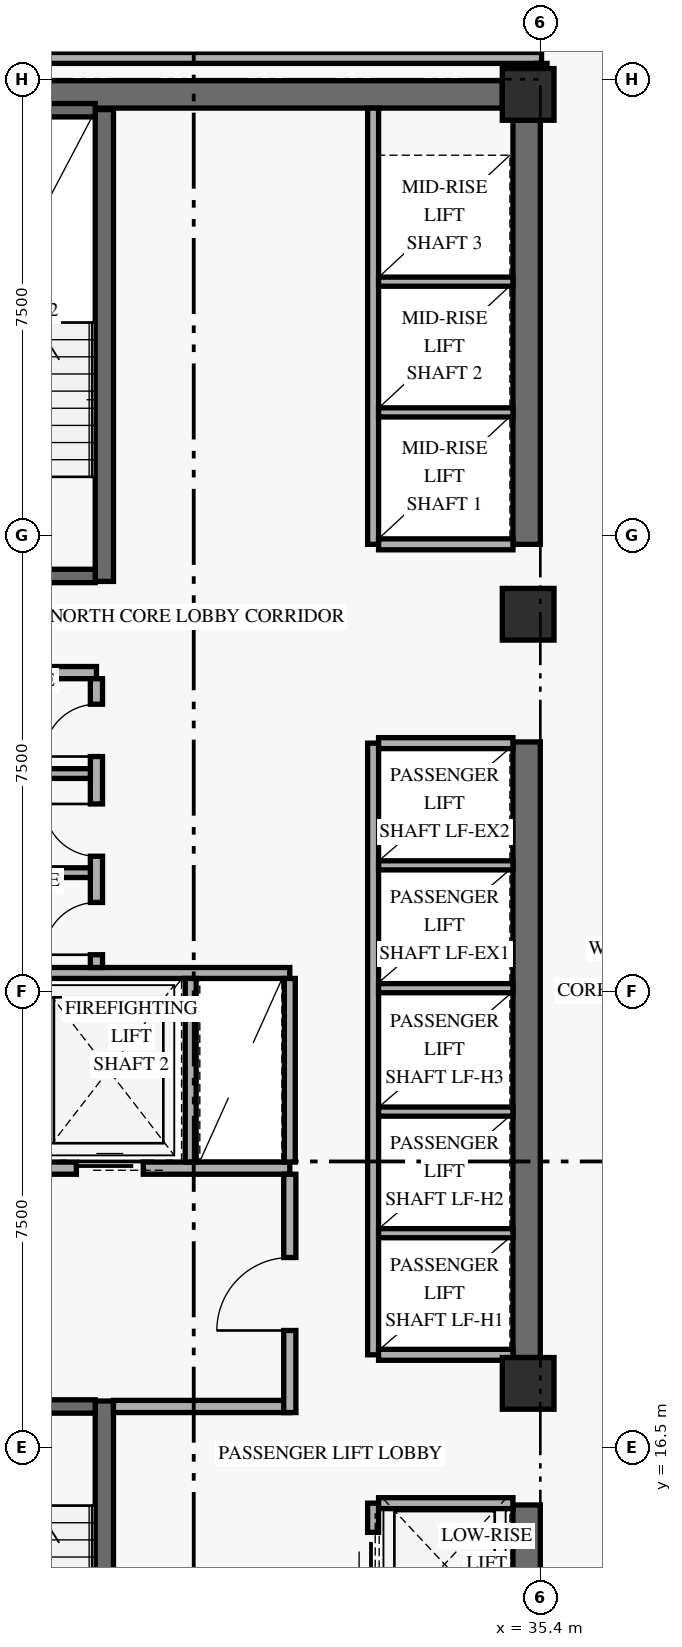
"""IFC4 building model, lengths in metres.
Left out: names, types, materials, properties, quantities, classifications, styles, units other than length and angle.
Written with IfcOpenShell. Run it as: python <this file> out.ifc"""

import sys

from ifc_helpers import new_model, si_unit, direction, frame, frame_2d, origin, origin_2d, place, context, subcontext, project, spatial, rectangle, extrude, element, fill, save


model = new_model("IFC4")
c1 = context("Model", 3, precision=1e-05, world=origin(), true_north=direction((0.0, 1.0)))
c2 = subcontext(c1, "Body", "Model", "MODEL_VIEW")
j1 = project(units=[si_unit("LENGTHUNIT", "METRE"), si_unit("PLANEANGLEUNIT", "RADIAN")], contexts=[c1])
p1 = place(None, origin())
s1 = spatial("IfcSite", under=j1, at=p1, CompositionType="ELEMENT")
p2 = place(p1, origin())
s2 = spatial("IfcBuilding", under=s1, at=p2, CompositionType="ELEMENT")
p3 = place(p2, frame((0.0, 0.0, 91.2)))
s3 = spatial("IfcBuildingStorey", under=s2, at=p3, CompositionType="ELEMENT", Elevation=91.2)
p4 = place(p3, frame((35.175, 9.675, 0.0), z_axis=(0.0, 0.0, 1.0), x_axis=(0.0, 1.0, 0.0)))
e1 = element("IfcWall", 1, at=p4, inside=s3, PredefinedType="SHEAR", context=c2, shape_type="SweptSolid", body=[
    extrude(rectangle(XDim=5.875, YDim=0.45, at=frame_2d((2.938, 0.0))), origin(), (0.0, 0.0, 1.0), 2.749),
])
p5 = place(p3, frame((35.175, 17.975, 0.0), z_axis=(0.0, 0.0, 1.0), x_axis=(0.0, 1.0, 0.0)))
e2 = element("IfcWall", 2, at=p5, inside=s3, PredefinedType="SHEAR", context=c2, shape_type="SweptSolid", body=[
    extrude(rectangle(XDim=10.125, YDim=0.45, at=frame_2d((5.062, 0.0))), origin(), (0.0, 0.0, 1.0), 2.749),
])
p6 = place(p3, frame((35.175, 31.35, 0.0), z_axis=(0.0, 0.0, 1.0), x_axis=(0.0, 1.0, 0.0)))
e3 = element("IfcWall", 3, at=p6, inside=s3, PredefinedType="SHEAR", context=c2, shape_type="SweptSolid", body=[
    extrude(rectangle(XDim=6.975, YDim=0.45, at=frame_2d((3.487, 0.0))), origin(), (0.0, 0.0, 1.0), 2.749),
])
p7 = place(p3, frame((24.625, 38.75, 0.0), z_axis=(0.0, 0.0, 1.0), x_axis=(1.0, 0.0, 0.0)))
e4 = element("IfcWall", 4, at=p7, inside=s3, PredefinedType="SHEAR", context=c2, shape_type="SweptSolid", body=[
    extrude(rectangle(XDim=10.15, YDim=0.45, at=frame_2d((5.075, 0.0))), origin(), (0.0, 0.0, 1.0), 3.36),
])
p8 = place(p3, frame((28.23, 9.5, 0.0), z_axis=(0.0, 0.0, 1.0), x_axis=(0.0, 1.0, 0.0)))
e5 = element("IfcWall", 5, at=p8, inside=s3, PredefinedType="SHEAR", context=c2, shape_type="SweptSolid", body=[
    extrude(rectangle(XDim=7.76, YDim=0.3, at=frame_2d((3.88, 0.0))), origin(), (0.0, 0.0, 1.0), 3.36),
])
p9 = place(p3, frame((24.92, 17.17, 0.0), z_axis=(0.0, 0.0, 1.0), x_axis=(1.0, 0.0, 0.0)))
e6 = element("IfcWall", 6, at=p9, inside=s3, PredefinedType="SHEAR", context=c2, shape_type="SweptSolid", body=[
    extrude(rectangle(XDim=3.16, YDim=0.22, at=frame_2d((1.58, 0.0))), origin(), (0.0, 0.0, 1.0), 3.36),
])
p10 = place(p9, frame((0.78, 0.0, 0.0)))
e7 = element("IfcOpeningElement", 7, at=p10, cuts=e6, PredefinedType="OPENING", context=c2, shape_type="SweptSolid", body=[
    extrude(rectangle(XDim=1.05, YDim=2.15, at=frame_2d((0.525, 1.075))), frame((0.0, 0.12, 0.0), z_axis=(0.0, -1.0, 0.0), x_axis=(1.0, 0.0, 0.0)), (0.0, 0.0, 1.0), 0.24),
])
p11 = place(p3, frame((28.23, 30.74, 0.0), z_axis=(0.0, 0.0, 1.0), x_axis=(0.0, 1.0, 0.0)))
e8 = element("IfcWall", 8, at=p11, inside=s3, PredefinedType="SHEAR", context=c2, shape_type="SweptSolid", body=[
    extrude(rectangle(XDim=7.76, YDim=0.3, at=frame_2d((3.88, 0.0))), origin(), (0.0, 0.0, 1.0), 3.36),
])
p12 = place(p3, frame((24.92, 30.83, 0.0), z_axis=(0.0, 0.0, 1.0), x_axis=(1.0, 0.0, 0.0)))
e9 = element("IfcWall", 9, at=p12, inside=s3, PredefinedType="SHEAR", context=c2, shape_type="SweptSolid", body=[
    extrude(rectangle(XDim=3.16, YDim=0.22, at=frame_2d((1.58, 0.0))), origin(), (0.0, 0.0, 1.0), 3.36),
])
p13 = place(p12, frame((0.78, 0.0, 0.0)))
e10 = element("IfcOpeningElement", 10, at=p13, cuts=e9, PredefinedType="OPENING", context=c2, shape_type="SweptSolid", body=[
    extrude(rectangle(XDim=1.05, YDim=2.15, at=frame_2d((0.525, 1.075))), frame((0.0, 0.12, 0.0), z_axis=(0.0, -1.0, 0.0), x_axis=(1.0, 0.0, 0.0)), (0.0, 0.0, 1.0), 0.24),
])
p14 = place(p3, frame((24.92, 38.49, 0.0), z_axis=(0.0, 0.0, 1.0), x_axis=(1.0, 0.0, 0.0)))
e11 = element("IfcWall", 11, at=p14, inside=s3, PredefinedType="SHEAR", context=c2, shape_type="SweptSolid", body=[
    extrude(rectangle(XDim=3.16, YDim=0.22, at=frame_2d((1.58, 0.0))), origin(), (0.0, 0.0, 1.0), 3.36),
])
for number, where, z_axis, x_axis in (
    (12, (35.2, 17.55, 0.0), (0.0, 0.0, 1.0), (1.0, 0.0, 0.0)),
    (13, (35.2, 30.2, 0.0), (0.0, 0.0, 1.0), (1.0, 0.0, 0.0)),
    (14, (35.2, 38.75, 0.0), (0.0, 0.0, 1.0), (1.0, 0.0, 0.0)),
):
    element("IfcColumn", number, at=place(p3, frame(where, z_axis=z_axis, x_axis=x_axis)), inside=s3, PredefinedType="COLUMN", context=c2, shape_type="SweptSolid", body=[
        extrude(rectangle(XDim=0.85, YDim=0.85, at=origin_2d()), origin(), (0.0, 0.0, 1.0), 3.6),
    ])
p15 = place(p3, frame((24.45, 21.09, 0.0), z_axis=(0.0, 0.0, 1.0), x_axis=(1.0, 0.0, 0.0)))
e15 = element("IfcWall", 15, at=p15, inside=s3, PredefinedType="STANDARD", context=c2, shape_type="SweptSolid", body=[
    extrude(rectangle(XDim=6.83, YDim=0.2, at=frame_2d((3.415, 0.0))), origin(), (0.0, 0.0, 1.0), 3.36),
])
p16 = place(p15, frame((0.72, 0.0, 0.0)))
e16 = element("IfcOpeningElement", 16, at=p16, cuts=e15, PredefinedType="OPENING", context=c2, shape_type="SweptSolid", body=[
    extrude(rectangle(XDim=1.1, YDim=2.2, at=frame_2d((0.55, 1.1))), frame((0.0, 0.11, 0.0), z_axis=(0.0, -1.0, 0.0), x_axis=(1.0, 0.0, 0.0)), (0.0, 0.0, 1.0), 0.22),
])
p17 = place(p15, frame((3.32, 0.0, 0.0)))
e17 = element("IfcOpeningElement", 17, at=p17, cuts=e15, PredefinedType="OPENING", context=c2, shape_type="SweptSolid", body=[
    extrude(rectangle(XDim=1.1, YDim=2.2, at=frame_2d((0.55, 1.1))), frame((0.0, 0.11, 0.0), z_axis=(0.0, -1.0, 0.0), x_axis=(1.0, 0.0, 0.0)), (0.0, 0.0, 1.0), 0.22),
])
p18 = place(p3, frame((28.38, 17.17, 0.0), z_axis=(0.0, 0.0, 1.0), x_axis=(1.0, 0.0, 0.0)))
e18 = element("IfcWall", 18, at=p18, inside=s3, PredefinedType="STANDARD", context=c2, shape_type="SweptSolid", body=[
    extrude(rectangle(XDim=2.9, YDim=0.2, at=frame_2d((1.45, 0.0))), origin(), (0.0, 0.0, 1.0), 3.36),
])
p19 = place(p3, frame((31.28, 17.07, 0.0), z_axis=(0.0, 0.0, 1.0), x_axis=(0.0, 1.0, 0.0)))
e19 = element("IfcWall", 19, at=p19, inside=s3, PredefinedType="STANDARD", context=c2, shape_type="SweptSolid", body=[
    extrude(rectangle(XDim=3.92, YDim=0.2, at=frame_2d((1.96, 0.0))), origin(), (0.0, 0.0, 1.0), 2.731),
])
p20 = place(p19, frame((1.35, 0.0, 0.0)))
e20 = element("IfcOpeningElement", 20, at=p20, cuts=e19, PredefinedType="OPENING", context=c2, shape_type="SweptSolid", body=[
    extrude(rectangle(XDim=1.2, YDim=2.15, at=frame_2d((0.6, 1.075))), frame((0.0, 0.11, 0.0), z_axis=(0.0, -1.0, 0.0), x_axis=(1.0, 0.0, 0.0)), (0.0, 0.0, 1.0), 0.22),
])
p21 = place(p3, frame((24.45, 24.3, 0.0), z_axis=(0.0, 0.0, 1.0), x_axis=(1.0, 0.0, 0.0)))
e21 = element("IfcWall", 21, at=p21, inside=s3, PredefinedType="STANDARD", context=c2, shape_type="SweptSolid", body=[
    extrude(rectangle(XDim=6.83, YDim=0.18, at=frame_2d((3.415, 0.0))), origin(), (0.0, 0.0, 1.0), 3.36),
])
for number, where, z_axis, x_axis in (
    (22, (29.65, 21.19, 0.0), (0.0, 0.0, 1.0), (0.0, 1.0, 0.0)),
    (23, (31.28, 21.19, 0.0), (0.0, 0.0, 1.0), (0.0, 1.0, 0.0)),
):
    element("IfcWall", number, at=place(p3, frame(where, z_axis=z_axis, x_axis=x_axis)), inside=s3, PredefinedType="STANDARD", context=c2, shape_type="SweptSolid", body=[
        extrude(rectangle(XDim=3.02, YDim=0.18, at=frame_2d((1.51, 0.0))), origin(), (0.0, 0.0, 1.0), 3.36),
    ])
p22 = place(p3, frame((24.45, 29.24, 0.0), z_axis=(0.0, 0.0, 1.0), x_axis=(1.0, 0.0, 0.0)))
e24 = element("IfcWall", 24, at=p22, inside=s3, PredefinedType="STANDARD", context=c2, shape_type="SweptSolid", body=[
    extrude(rectangle(XDim=3.65, YDim=0.2, at=frame_2d((1.825, 0.0))), origin(), (0.0, 0.0, 1.0), 3.36),
])
p23 = place(p3, frame((28.1, 24.39, 0.0), z_axis=(0.0, 0.0, 1.0), x_axis=(0.0, 1.0, 0.0)))
e25 = element("IfcWall", 25, at=p23, inside=s3, PredefinedType="STANDARD", context=c2, shape_type="SweptSolid", body=[
    extrude(rectangle(XDim=4.75, YDim=0.2, at=frame_2d((2.375, 0.0))), origin(), (0.0, 0.0, 1.0), 3.36),
])
p24 = place(p23, frame((0.21, 0.0, 0.0)))
e26 = element("IfcOpeningElement", 26, at=p24, cuts=e25, PredefinedType="OPENING", context=c2, shape_type="SweptSolid", body=[
    extrude(rectangle(XDim=0.86, YDim=2.1, at=frame_2d((0.43, 1.05))), frame((0.0, 0.11, 0.0), z_axis=(0.0, -1.0, 0.0), x_axis=(1.0, 0.0, 0.0)), (0.0, 0.0, 1.0), 0.22),
])
p25 = place(p23, frame((1.83, 0.0, 0.0)))
e27 = element("IfcOpeningElement", 27, at=p25, cuts=e25, PredefinedType="OPENING", context=c2, shape_type="SweptSolid", body=[
    extrude(rectangle(XDim=0.86, YDim=2.1, at=frame_2d((0.43, 1.05))), frame((0.0, 0.11, 0.0), z_axis=(0.0, -1.0, 0.0), x_axis=(1.0, 0.0, 0.0)), (0.0, 0.0, 1.0), 0.22),
])
p26 = place(p23, frame((3.47, 0.0, 0.0)))
e28 = element("IfcOpeningElement", 28, at=p26, cuts=e25, PredefinedType="OPENING", context=c2, shape_type="SweptSolid", body=[
    extrude(rectangle(XDim=0.86, YDim=2.1, at=frame_2d((0.43, 1.05))), frame((0.0, 0.11, 0.0), z_axis=(0.0, -1.0, 0.0), x_axis=(1.0, 0.0, 0.0)), (0.0, 0.0, 1.0), 0.22),
])
for number, where, z_axis, x_axis in (
    (29, (24.45, 25.95, 0.0), (0.0, 0.0, 1.0), (1.0, 0.0, 0.0)),
    (30, (24.45, 27.58, 0.0), (0.0, 0.0, 1.0), (1.0, 0.0, 0.0)),
):
    element("IfcWall", number, at=place(p3, frame(where, z_axis=z_axis, x_axis=x_axis)), inside=s3, PredefinedType="PARTITIONING", context=c2, shape_type="SweptSolid", body=[
        extrude(rectangle(XDim=3.55, YDim=0.16, at=frame_2d((1.775, 0.0))), origin(), (0.0, 0.0, 1.0), 3.36),
    ])
p27 = place(p3, frame((32.65, 9.5, 0.0), z_axis=(0.0, 0.0, 1.0), x_axis=(0.0, 1.0, 0.0)))
e31 = element("IfcWall", 31, at=p27, inside=s3, PredefinedType="STANDARD", context=c2, shape_type="SweptSolid", body=[
    extrude(rectangle(XDim=6.08, YDim=0.18, at=frame_2d((3.04, 0.0))), origin(), (0.0, 0.0, 1.0), 3.36),
])
p28 = place(p27, frame((0.55, 0.0, 0.0)))
e32 = element("IfcOpeningElement", 32, at=p28, cuts=e31, PredefinedType="OPENING", context=c2, shape_type="SweptSolid", body=[
    extrude(rectangle(XDim=1.05, YDim=2.2, at=frame_2d((0.525, 1.1))), frame((0.0, 0.1, 0.0), z_axis=(0.0, -1.0, 0.0), x_axis=(1.0, 0.0, 0.0)), (0.0, 0.0, 1.0), 0.2),
])
p29 = place(p27, frame((2.55, 0.0, 0.0)))
e33 = element("IfcOpeningElement", 33, at=p29, cuts=e31, PredefinedType="OPENING", context=c2, shape_type="SweptSolid", body=[
    extrude(rectangle(XDim=1.05, YDim=2.2, at=frame_2d((0.525, 1.1))), frame((0.0, 0.1, 0.0), z_axis=(0.0, -1.0, 0.0), x_axis=(1.0, 0.0, 0.0)), (0.0, 0.0, 1.0), 0.2),
])
p30 = place(p27, frame((4.55, 0.0, 0.0)))
e34 = element("IfcOpeningElement", 34, at=p30, cuts=e31, PredefinedType="OPENING", context=c2, shape_type="SweptSolid", body=[
    extrude(rectangle(XDim=1.05, YDim=2.2, at=frame_2d((0.525, 1.1))), frame((0.0, 0.1, 0.0), z_axis=(0.0, -1.0, 0.0), x_axis=(1.0, 0.0, 0.0)), (0.0, 0.0, 1.0), 0.2),
])
p31 = place(p3, frame((32.74, 15.58, 0.0), z_axis=(0.0, 0.0, 1.0), x_axis=(1.0, 0.0, 0.0)))
e35 = element("IfcWall", 35, at=p31, inside=s3, PredefinedType="STANDARD", context=c2, shape_type="SweptSolid", body=[
    extrude(rectangle(XDim=2.21, YDim=0.18, at=frame_2d((1.105, 0.0))), origin(), (0.0, 0.0, 1.0), 3.36),
])
p32 = place(p3, frame((32.65, 18.02, 0.0), z_axis=(0.0, 0.0, 1.0), x_axis=(0.0, 1.0, 0.0)))
e36 = element("IfcWall", 36, at=p32, inside=s3, PredefinedType="STANDARD", context=c2, shape_type="SweptSolid", body=[
    extrude(rectangle(XDim=10.06, YDim=0.18, at=frame_2d((5.03, 0.0))), origin(), (0.0, 0.0, 1.0), 3.36),
])
for number, where, z_axis, x_axis in (
    (37, (32.74, 18.02, 0.0), (0.0, 0.0, 1.0), (1.0, 0.0, 0.0)),
    (38, (32.74, 28.08, 0.0), (0.0, 0.0, 1.0), (1.0, 0.0, 0.0)),
):
    element("IfcWall", number, at=place(p3, frame(where, z_axis=z_axis, x_axis=x_axis)), inside=s3, PredefinedType="STANDARD", context=c2, shape_type="SweptSolid", body=[
        extrude(rectangle(XDim=2.21, YDim=0.18, at=frame_2d((1.105, 0.0))), origin(), (0.0, 0.0, 1.0), 3.36),
    ])
for number, where, z_axis, x_axis in (
    (39, (32.74, 20.02, 0.0), (0.0, 0.0, 1.0), (1.0, 0.0, 0.0)),
    (40, (32.74, 22.02, 0.0), (0.0, 0.0, 1.0), (1.0, 0.0, 0.0)),
    (41, (32.74, 24.05, 0.0), (0.0, 0.0, 1.0), (1.0, 0.0, 0.0)),
    (42, (32.74, 26.07, 0.0), (0.0, 0.0, 1.0), (1.0, 0.0, 0.0)),
):
    element("IfcWall", number, at=place(p3, frame(where, z_axis=z_axis, x_axis=x_axis)), inside=s3, PredefinedType="STANDARD", context=c2, shape_type="SweptSolid", body=[
        extrude(rectangle(XDim=2.21, YDim=0.15, at=frame_2d((1.105, 0.0))), origin(), (0.0, 0.0, 1.0), 3.36),
    ])
p33 = place(p3, frame((32.65, 31.35, 0.0), z_axis=(0.0, 0.0, 1.0), x_axis=(0.0, 1.0, 0.0)))
e43 = element("IfcWall", 43, at=p33, inside=s3, PredefinedType="STANDARD", context=c2, shape_type="SweptSolid", body=[
    extrude(rectangle(XDim=7.175, YDim=0.18, at=frame_2d((3.587, 0.0))), origin(), (0.0, 0.0, 1.0), 3.36),
])
p34 = place(p3, frame((32.74, 31.35, 0.0), z_axis=(0.0, 0.0, 1.0), x_axis=(1.0, 0.0, 0.0)))
e44 = element("IfcWall", 44, at=p34, inside=s3, PredefinedType="STANDARD", context=c2, shape_type="SweptSolid", body=[
    extrude(rectangle(XDim=2.21, YDim=0.18, at=frame_2d((1.105, 0.0))), origin(), (0.0, 0.0, 1.0), 3.36),
])
for number, where, z_axis, x_axis in (
    (45, (32.74, 33.52, 0.0), (0.0, 0.0, 1.0), (1.0, 0.0, 0.0)),
    (46, (32.74, 35.67, 0.0), (0.0, 0.0, 1.0), (1.0, 0.0, 0.0)),
):
    element("IfcWall", number, at=place(p3, frame(where, z_axis=z_axis, x_axis=x_axis)), inside=s3, PredefinedType="STANDARD", context=c2, shape_type="SweptSolid", body=[
        extrude(rectangle(XDim=2.21, YDim=0.15, at=frame_2d((1.105, 0.0))), origin(), (0.0, 0.0, 1.0), 3.36),
    ])
p35 = place(p3, frame((23.75, 39.35, 0.0), z_axis=(0.0, 0.0, 1.0), x_axis=(1.0, 0.0, 0.0)))
e47 = element("IfcWall", 47, at=p35, inside=s3, PredefinedType="STANDARD", context=c2, shape_type="SweptSolid", body=[
    extrude(rectangle(XDim=11.67, YDim=0.18, at=frame_2d((5.835, 0.0))), origin(), (0.0, 0.0, 1.0), 2.731),
])
p36 = place(p3, frame((35.42, 38.75, 0.0), z_axis=(0.0, 0.0, 1.0), x_axis=(0.0, 1.0, 0.0)))
e48 = element("IfcWall", 48, at=p36, inside=s3, PredefinedType="STANDARD", context=c2, shape_type="SweptSolid", body=[
    extrude(rectangle(XDim=0.51, YDim=0.18, at=frame_2d((0.255, 0.0))), origin(), (0.0, 0.0, 1.0), 2.731),
])
p37 = place(p17, origin())
e49 = element("IfcDoor", 49, at=p37, inside=s3, OperationType="SLIDING_TO_LEFT", PredefinedType="DOOR", context=c2, shape_type="SweptSolid", body=[
    extrude(rectangle(XDim=1.1, YDim=2.2, at=frame_2d((0.55, 1.1))), frame((0.0, 0.025, 0.0), z_axis=(0.0, -1.0, 0.0), x_axis=(1.0, 0.0, 0.0)), (0.0, 0.0, 1.0), 0.05),
])
fill(e17, e49)
p38 = place(p20, origin())
e50 = element("IfcDoor", 50, at=p38, inside=s3, OperationType="SINGLE_SWING_LEFT", PredefinedType="DOOR", context=c2, shape_type="SweptSolid", body=[
    extrude(rectangle(XDim=1.2, YDim=2.15, at=frame_2d((0.6, 1.075))), frame((0.0, 0.025, 0.0), z_axis=(0.0, -1.0, 0.0), x_axis=(1.0, 0.0, 0.0)), (0.0, 0.0, 1.0), 0.05),
])
fill(e20, e50)
p39 = place(p24, origin())
e51 = element("IfcDoor", 51, at=p39, inside=s3, OperationType="SINGLE_SWING_LEFT", PredefinedType="DOOR", context=c2, shape_type="SweptSolid", body=[
    extrude(rectangle(XDim=0.86, YDim=2.1, at=frame_2d((0.43, 1.05))), frame((0.0, 0.025, 0.0), z_axis=(0.0, -1.0, 0.0), x_axis=(1.0, 0.0, 0.0)), (0.0, 0.0, 1.0), 0.05),
])
fill(e26, e51)
p40 = place(p25, origin())
e52 = element("IfcDoor", 52, at=p40, inside=s3, OperationType="SINGLE_SWING_RIGHT", PredefinedType="DOOR", context=c2, shape_type="SweptSolid", body=[
    extrude(rectangle(XDim=0.86, YDim=2.1, at=frame_2d((0.43, 1.05))), frame((0.0, 0.025, 0.0), z_axis=(0.0, -1.0, 0.0), x_axis=(1.0, 0.0, 0.0)), (0.0, 0.0, 1.0), 0.05),
])
fill(e27, e52)
p41 = place(p26, origin())
e53 = element("IfcDoor", 53, at=p41, inside=s3, OperationType="SINGLE_SWING_LEFT", PredefinedType="DOOR", context=c2, shape_type="SweptSolid", body=[
    extrude(rectangle(XDim=0.86, YDim=2.1, at=frame_2d((0.43, 1.05))), frame((0.0, 0.025, 0.0), z_axis=(0.0, -1.0, 0.0), x_axis=(1.0, 0.0, 0.0)), (0.0, 0.0, 1.0), 0.05),
])
fill(e28, e53)
p42 = place(p30, origin())
e54 = element("IfcDoor", 54, at=p42, inside=s3, OperationType="SLIDING_TO_LEFT", PredefinedType="DOOR", context=c2, shape_type="SweptSolid", body=[
    extrude(rectangle(XDim=1.05, YDim=2.2, at=frame_2d((0.525, 1.1))), frame((0.0, 0.025, 0.0), z_axis=(0.0, -1.0, 0.0), x_axis=(1.0, 0.0, 0.0)), (0.0, 0.0, 1.0), 0.05),
])
fill(e34, e54)
save(model, sys.argv[1])
